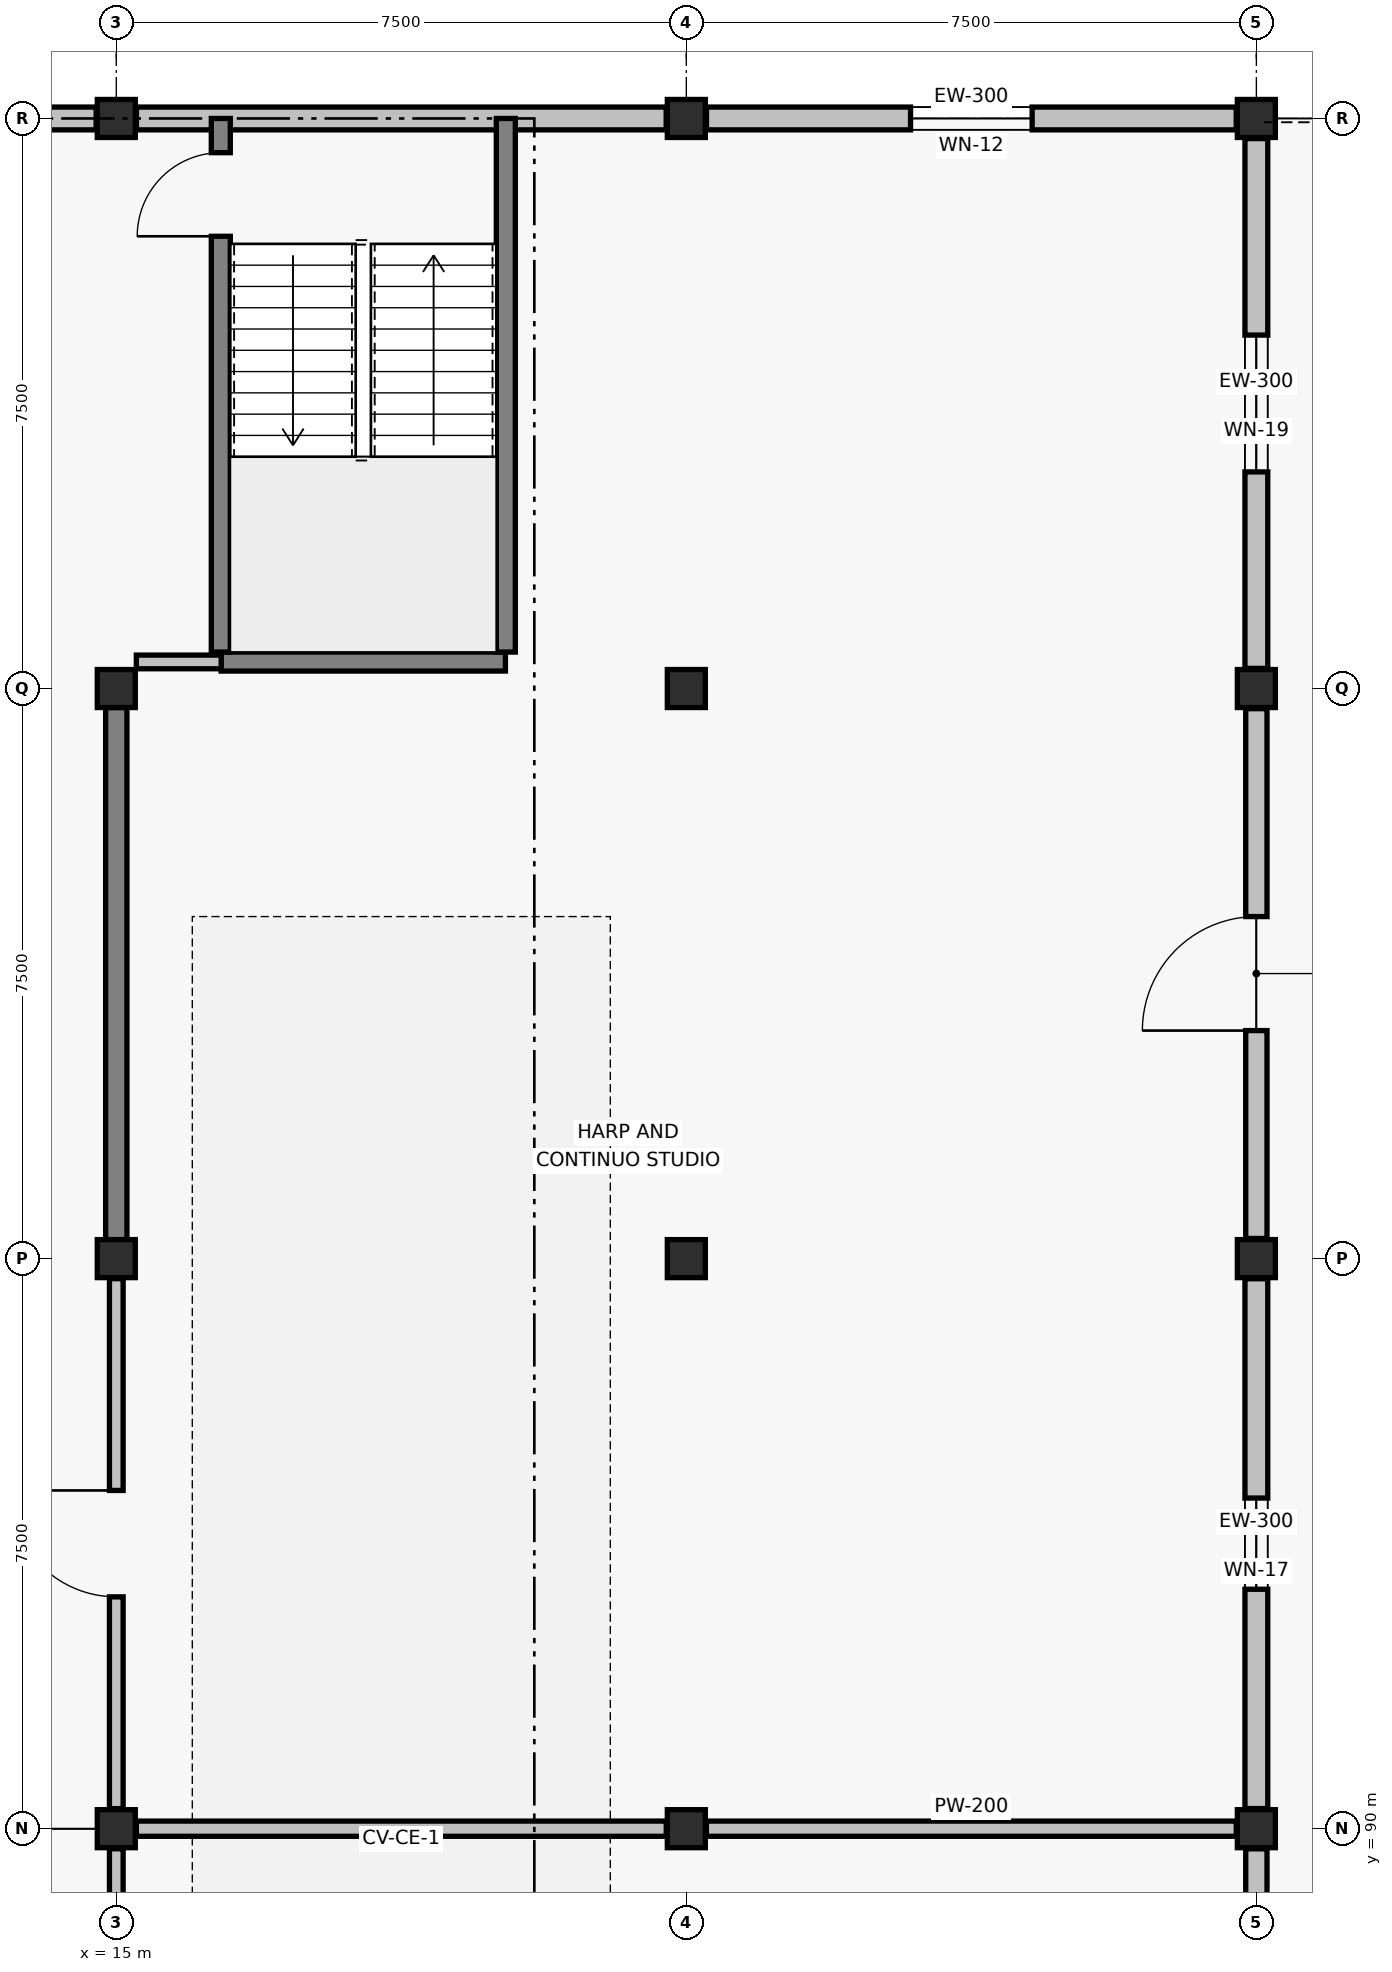
"""IFC4 building model, lengths in metres.
Left out: names, types, materials, properties, quantities, classifications, styles, units other than length and angle.
Written with IfcOpenShell. Run it as: python <this file> out.ifc"""

import sys

from ifc_helpers import new_model, si_unit, direction, frame, frame_2d, origin, origin_2d, place, context, subcontext, project, spatial, rectangle, extrude, element, fill, save


model = new_model("IFC4")
c1 = context("Model", 3, precision=1e-05, world=origin(), true_north=direction((0.0, 1.0)))
c2 = subcontext(c1, "Body", "Model", "MODEL_VIEW")
j1 = project(units=[si_unit("LENGTHUNIT", "METRE"), si_unit("PLANEANGLEUNIT", "RADIAN")], contexts=[c1])
p1 = place(None, origin())
s1 = spatial("IfcSite", under=j1, at=p1, CompositionType="ELEMENT")
p2 = place(p1, origin())
s2 = spatial("IfcBuilding", under=s1, at=p2, CompositionType="ELEMENT")
p3 = place(p2, frame((0.0, 0.0, 17.1)))
s3 = spatial("IfcBuildingStorey", under=s2, at=p3, CompositionType="ELEMENT", Elevation=17.1)
for number, where, z_axis, x_axis in (
    (1, (15.0, 90.0, 0.0), (0.0, 0.0, 1.0), (1.0, 0.0, 0.0)),
    (2, (15.0, 97.5, 0.0), (0.0, 0.0, 1.0), (1.0, 0.0, 0.0)),
    (3, (15.0, 105.0, 0.0), (0.0, 0.0, 1.0), (1.0, 0.0, 0.0)),
    (4, (15.0, 112.5, 0.0), (0.0, 0.0, 1.0), (1.0, 0.0, 0.0)),
    (5, (22.5, 90.0, 0.0), (0.0, 0.0, 1.0), (1.0, 0.0, 0.0)),
    (6, (22.5, 97.5, 0.0), (0.0, 0.0, 1.0), (1.0, 0.0, 0.0)),
    (7, (22.5, 105.0, 0.0), (0.0, 0.0, 1.0), (1.0, 0.0, 0.0)),
    (8, (22.5, 112.5, 0.0), (0.0, 0.0, 1.0), (1.0, 0.0, 0.0)),
    (9, (30.0, 90.0, 0.0), (0.0, 0.0, 1.0), (1.0, 0.0, 0.0)),
    (10, (30.0, 97.5, 0.0), (0.0, 0.0, 1.0), (1.0, 0.0, 0.0)),
    (11, (30.0, 105.0, 0.0), (0.0, 0.0, 1.0), (1.0, 0.0, 0.0)),
    (12, (30.0, 112.5, 0.0), (0.0, 0.0, 1.0), (1.0, 0.0, 0.0)),
):
    element("IfcColumn", number, at=place(p3, frame(where, z_axis=z_axis, x_axis=x_axis)), inside=s3, PredefinedType="COLUMN", context=c2, shape_type="SweptSolid", body=[
        extrude(rectangle(XDim=0.5, YDim=0.5, at=origin_2d()), origin(), (0.0, 0.0, 1.0), 3.9),
    ])
p4 = place(p3, frame((15.0, 97.75, 0.0), z_axis=(0.0, 0.0, 1.0), x_axis=(0.0, 1.0, 0.0)))
e13 = element("IfcWall", 13, at=p4, inside=s3, PredefinedType="SHEAR", context=c2, shape_type="SweptSolid", body=[
    extrude(rectangle(XDim=7.0, YDim=0.28, at=frame_2d((3.5, 0.0))), origin(), (0.0, 0.0, 1.0), 3.6),
])
p5 = place(p3, frame((8.12, 112.5, 0.0), z_axis=(0.0, 0.0, 1.0), x_axis=(1.0, 0.0, 0.0)))
e14 = element("IfcWall", 14, at=p5, inside=s3, PredefinedType="SOLIDWALL", context=c2, shape_type="SweptSolid", body=[
    extrude(rectangle(XDim=6.615, YDim=0.3, at=frame_2d((3.308, 0.0))), origin(), (0.0, 0.0, 1.0), 2.59),
])
p6 = place(p5, frame((2.48, 0.0, 0.6)))
e15 = element("IfcOpeningElement", 15, at=p6, cuts=e14, PredefinedType="OPENING", context=c2, shape_type="SweptSolid", body=[
    extrude(rectangle(XDim=1.3, YDim=1.3, at=frame_2d((0.65, 0.65))), frame((0.0, 0.16, 0.0), z_axis=(0.0, -1.0, 0.0), x_axis=(1.0, 0.0, 0.0)), (0.0, 0.0, 1.0), 0.32),
])
p7 = place(p3, frame((15.265, 112.5, 0.0), z_axis=(0.0, 0.0, 1.0), x_axis=(1.0, 0.0, 0.0)))
e16 = element("IfcWall", 16, at=p7, inside=s3, PredefinedType="SOLIDWALL", context=c2, shape_type="SweptSolid", body=[
    extrude(rectangle(XDim=6.97, YDim=0.3, at=frame_2d((3.485, 0.0))), origin(), (0.0, 0.0, 1.0), 2.59),
])
p8 = place(p3, frame((22.765, 112.5, 0.0), z_axis=(0.0, 0.0, 1.0), x_axis=(1.0, 0.0, 0.0)))
e17 = element("IfcWall", 17, at=p8, inside=s3, PredefinedType="SOLIDWALL", context=c2, shape_type="SweptSolid", body=[
    extrude(rectangle(XDim=6.97, YDim=0.3, at=frame_2d((3.485, 0.0))), origin(), (0.0, 0.0, 1.0), 2.84),
])
p9 = place(p8, frame((2.685, 0.0, 0.6)))
e18 = element("IfcOpeningElement", 18, at=p9, cuts=e17, PredefinedType="OPENING", context=c2, shape_type="SweptSolid", body=[
    extrude(rectangle(XDim=1.6, YDim=1.3, at=frame_2d((0.8, 0.65))), frame((0.0, 0.16, 0.0), z_axis=(0.0, -1.0, 0.0), x_axis=(1.0, 0.0, 0.0)), (0.0, 0.0, 1.0), 0.32),
])
p10 = place(p3, frame((30.0, 82.765, 0.0), z_axis=(0.0, 0.0, 1.0), x_axis=(0.0, 1.0, 0.0)))
e19 = element("IfcWall", 19, at=p10, inside=s3, PredefinedType="SOLIDWALL", context=c2, shape_type="SweptSolid", body=[
    extrude(rectangle(XDim=6.97, YDim=0.28, at=frame_2d((3.485, 0.0))), origin(), (0.0, 0.0, 1.0), 2.69),
])
p11 = place(p10, frame((2.735, 0.0, 0.0)))
e20 = element("IfcOpeningElement", 20, at=p11, cuts=e19, PredefinedType="OPENING", context=c2, shape_type="SweptSolid", body=[
    extrude(rectangle(XDim=1.5, YDim=2.15, at=frame_2d((0.75, 1.075))), frame((0.0, 0.15, 0.0), z_axis=(0.0, -1.0, 0.0), x_axis=(1.0, 0.0, 0.0)), (0.0, 0.0, 1.0), 0.3),
])
p12 = place(p3, frame((30.0, 90.265, 0.0), z_axis=(0.0, 0.0, 1.0), x_axis=(0.0, 1.0, 0.0)))
e21 = element("IfcWall", 21, at=p12, inside=s3, PredefinedType="SOLIDWALL", context=c2, shape_type="SweptSolid", body=[
    extrude(rectangle(XDim=6.97, YDim=0.3, at=frame_2d((3.485, 0.0))), origin(), (0.0, 0.0, 1.0), 2.64),
])
p13 = place(p12, frame((2.885, 0.0, 0.6)))
e22 = element("IfcOpeningElement", 22, at=p13, cuts=e21, PredefinedType="OPENING", context=c2, shape_type="SweptSolid", body=[
    extrude(rectangle(XDim=1.2, YDim=1.2, at=frame_2d((0.6, 0.6))), frame((0.0, 0.16, 0.0), z_axis=(0.0, -1.0, 0.0), x_axis=(1.0, 0.0, 0.0)), (0.0, 0.0, 1.0), 0.32),
])
p14 = place(p3, frame((30.0, 97.765, 0.0), z_axis=(0.0, 0.0, 1.0), x_axis=(0.0, 1.0, 0.0)))
e23 = element("IfcWall", 23, at=p14, inside=s3, PredefinedType="SOLIDWALL", context=c2, shape_type="SweptSolid", body=[
    extrude(rectangle(XDim=6.97, YDim=0.28, at=frame_2d((3.485, 0.0))), origin(), (0.0, 0.0, 1.0), 2.64),
])
p15 = place(p14, frame((2.735, 0.0, 0.0)))
e24 = element("IfcOpeningElement", 24, at=p15, cuts=e23, PredefinedType="OPENING", context=c2, shape_type="SweptSolid", body=[
    extrude(rectangle(XDim=1.5, YDim=2.15, at=frame_2d((0.75, 1.075))), frame((0.0, 0.15, 0.0), z_axis=(0.0, -1.0, 0.0), x_axis=(1.0, 0.0, 0.0)), (0.0, 0.0, 1.0), 0.3),
])
p16 = place(p3, frame((30.0, 105.265, 0.0), z_axis=(0.0, 0.0, 1.0), x_axis=(0.0, 1.0, 0.0)))
e25 = element("IfcWall", 25, at=p16, inside=s3, PredefinedType="SOLIDWALL", context=c2, shape_type="SweptSolid", body=[
    extrude(rectangle(XDim=6.97, YDim=0.3, at=frame_2d((3.485, 0.0))), origin(), (0.0, 0.0, 1.0), 2.79),
])
p17 = place(p16, frame((2.585, 0.0, 0.6)))
e26 = element("IfcOpeningElement", 26, at=p17, cuts=e25, PredefinedType="OPENING", context=c2, shape_type="SweptSolid", body=[
    extrude(rectangle(XDim=1.8, YDim=1.2, at=frame_2d((0.9, 0.6))), frame((0.0, 0.16, 0.0), z_axis=(0.0, -1.0, 0.0), x_axis=(1.0, 0.0, 0.0)), (0.0, 0.0, 1.0), 0.32),
])
p18 = place(p3, frame((16.38, 105.355, 0.0), z_axis=(0.0, 0.0, 1.0), x_axis=(1.0, 0.0, 0.0)))
e27 = element("IfcWall", 27, at=p18, inside=s3, PredefinedType="SOLIDWALL", context=c2, shape_type="SweptSolid", body=[
    extrude(rectangle(XDim=3.74, YDim=0.25, at=frame_2d((1.87, 0.0))), origin(), (0.0, 0.0, 1.0), 3.62),
])
p19 = place(p3, frame((16.375, 105.48, 0.0), z_axis=(0.0, 0.0, 1.0), x_axis=(0.0, 1.0, 0.0)))
e28 = element("IfcWall", 28, at=p19, inside=s3, PredefinedType="SOLIDWALL", context=c2, shape_type="SweptSolid", body=[
    extrude(rectangle(XDim=7.02, YDim=0.25, at=frame_2d((3.51, 0.0))), origin(), (0.0, 0.0, 1.0), 3.62),
])
p20 = place(p19, frame((5.47, 0.0, 0.0)))
e29 = element("IfcOpeningElement", 29, at=p20, cuts=e28, PredefinedType="OPENING", context=c2, shape_type="SweptSolid", body=[
    extrude(rectangle(XDim=1.1, YDim=2.15, at=frame_2d((0.55, 1.075))), frame((0.0, 0.135, 0.0), z_axis=(0.0, -1.0, 0.0), x_axis=(1.0, 0.0, 0.0)), (0.0, 0.0, 1.0), 0.27),
])
p21 = place(p3, frame((20.125, 105.48, 0.0), z_axis=(0.0, 0.0, 1.0), x_axis=(0.0, 1.0, 0.0)))
e30 = element("IfcWall", 30, at=p21, inside=s3, PredefinedType="SOLIDWALL", context=c2, shape_type="SweptSolid", body=[
    extrude(rectangle(XDim=7.02, YDim=0.25, at=frame_2d((3.51, 0.0))), origin(), (0.0, 0.0, 1.0), 3.62),
])
p22 = place(p3, frame((15.264, 105.35, 0.0), z_axis=(0.0, 0.0, 1.0), x_axis=(1.0, 0.0, 0.0)))
e31 = element("IfcWall", 31, at=p22, inside=s3, PredefinedType="PARTITIONING", context=c2, shape_type="SweptSolid", body=[
    extrude(rectangle(XDim=1.116, YDim=0.18, at=frame_2d((0.558, 0.0))), origin(), (0.0, 0.0, 1.0), 2.59),
])
p23 = place(p3, frame((15.264, 90.0, 0.0), z_axis=(0.0, 0.0, 1.0), x_axis=(1.0, 0.0, 0.0)))
e32 = element("IfcWall", 32, at=p23, inside=s3, PredefinedType="PARTITIONING", context=c2, shape_type="SweptSolid", body=[
    extrude(rectangle(XDim=6.972, YDim=0.2, at=frame_2d((3.486, 0.0))), origin(), (0.0, 0.0, 1.0), 2.59),
])
p24 = place(p3, frame((22.764, 90.0, 0.0), z_axis=(0.0, 0.0, 1.0), x_axis=(1.0, 0.0, 0.0)))
e33 = element("IfcWall", 33, at=p24, inside=s3, PredefinedType="PARTITIONING", context=c2, shape_type="SweptSolid", body=[
    extrude(rectangle(XDim=6.972, YDim=0.2, at=frame_2d((3.486, 0.0))), origin(), (0.0, 0.0, 1.0), 2.69),
])
p25 = place(p3, frame((15.0, 82.764, 0.0), z_axis=(0.0, 0.0, 1.0), x_axis=(0.0, 1.0, 0.0)))
e34 = element("IfcWall", 34, at=p25, inside=s3, PredefinedType="PARTITIONING", context=c2, shape_type="SweptSolid", body=[
    extrude(rectangle(XDim=6.972, YDim=0.18, at=frame_2d((3.486, 0.0))), origin(), (0.0, 0.0, 1.0), 2.54),
])
p26 = place(p25, frame((2.786, 0.0, 0.0)))
e35 = element("IfcOpeningElement", 35, at=p26, cuts=e34, PredefinedType="OPENING", context=c2, shape_type="SweptSolid", body=[
    extrude(rectangle(XDim=1.4, YDim=2.14, at=frame_2d((0.7, 1.07))), frame((0.0, 0.1, 0.0), z_axis=(0.0, -1.0, 0.0), x_axis=(1.0, 0.0, 0.0)), (0.0, 0.0, 1.0), 0.2),
])
p27 = place(p3, frame((15.0, 90.264, 0.0), z_axis=(0.0, 0.0, 1.0), x_axis=(0.0, 1.0, 0.0)))
e36 = element("IfcWall", 36, at=p27, inside=s3, PredefinedType="PARTITIONING", context=c2, shape_type="SweptSolid", body=[
    extrude(rectangle(XDim=6.972, YDim=0.18, at=frame_2d((3.486, 0.0))), origin(), (0.0, 0.0, 1.0), 2.59),
])
p28 = place(p27, frame((2.786, 0.0, 0.0)))
e37 = element("IfcOpeningElement", 37, at=p28, cuts=e36, PredefinedType="OPENING", context=c2, shape_type="SweptSolid", body=[
    extrude(rectangle(XDim=1.4, YDim=2.14, at=frame_2d((0.7, 1.07))), frame((0.0, 0.1, 0.0), z_axis=(0.0, -1.0, 0.0), x_axis=(1.0, 0.0, 0.0)), (0.0, 0.0, 1.0), 0.2),
])
p29 = place(p9, origin())
e38 = element("IfcWindow", 38, at=p29, inside=s3, PartitioningType="SINGLE_PANEL", PredefinedType="WINDOW", context=c2, shape_type="SweptSolid", body=[
    extrude(rectangle(XDim=1.6, YDim=1.3, at=frame_2d((0.8, 0.65))), frame((0.0, 0.03, 0.0), z_axis=(0.0, -1.0, 0.0), x_axis=(1.0, 0.0, 0.0)), (0.0, 0.0, 1.0), 0.06),
])
fill(e18, e38)
p30 = place(p13, origin())
e39 = element("IfcWindow", 39, at=p30, inside=s3, PartitioningType="SINGLE_PANEL", PredefinedType="WINDOW", context=c2, shape_type="SweptSolid", body=[
    extrude(rectangle(XDim=1.2, YDim=1.2, at=frame_2d((0.6, 0.6))), frame((0.0, 0.03, 0.0), z_axis=(0.0, -1.0, 0.0), x_axis=(1.0, 0.0, 0.0)), (0.0, 0.0, 1.0), 0.06),
])
fill(e22, e39)
p31 = place(p15, frame((1.5, 0.0, 0.0), z_axis=(0.0, 0.0, 1.0), x_axis=(-1.0, 0.0, 0.0)))
e40 = element("IfcDoor", 40, at=p31, inside=s3, OperationType="SINGLE_SWING_RIGHT", PredefinedType="DOOR", context=c2, shape_type="SweptSolid", body=[
    extrude(rectangle(XDim=1.5, YDim=2.15, at=frame_2d((0.75, 1.075))), frame((0.0, 0.025, 0.0), z_axis=(0.0, -1.0, 0.0), x_axis=(1.0, 0.0, 0.0)), (0.0, 0.0, 1.0), 0.05),
])
fill(e24, e40)
p32 = place(p17, origin())
e41 = element("IfcWindow", 41, at=p32, inside=s3, PartitioningType="SINGLE_PANEL", PredefinedType="WINDOW", context=c2, shape_type="SweptSolid", body=[
    extrude(rectangle(XDim=1.8, YDim=1.2, at=frame_2d((0.9, 0.6))), frame((0.0, 0.03, 0.0), z_axis=(0.0, -1.0, 0.0), x_axis=(1.0, 0.0, 0.0)), (0.0, 0.0, 1.0), 0.06),
])
fill(e26, e41)
p33 = place(p20, origin())
e42 = element("IfcDoor", 42, at=p33, inside=s3, OperationType="SINGLE_SWING_LEFT", PredefinedType="DOOR", context=c2, shape_type="SweptSolid", body=[
    extrude(rectangle(XDim=1.1, YDim=2.15, at=frame_2d((0.55, 1.075))), frame((0.0, 0.025, 0.0), z_axis=(0.0, -1.0, 0.0), x_axis=(1.0, 0.0, 0.0)), (0.0, 0.0, 1.0), 0.05),
])
fill(e29, e42)
p34 = place(p28, origin())
e43 = element("IfcDoor", 43, at=p34, inside=s3, OperationType="SINGLE_SWING_RIGHT", PredefinedType="DOOR", context=c2, shape_type="SweptSolid", body=[
    extrude(rectangle(XDim=1.4, YDim=2.14, at=frame_2d((0.7, 1.07))), frame((0.0, 0.025, 0.0), z_axis=(0.0, -1.0, 0.0), x_axis=(1.0, 0.0, 0.0)), (0.0, 0.0, 1.0), 0.05),
])
fill(e37, e43)
save(model, sys.argv[1])
